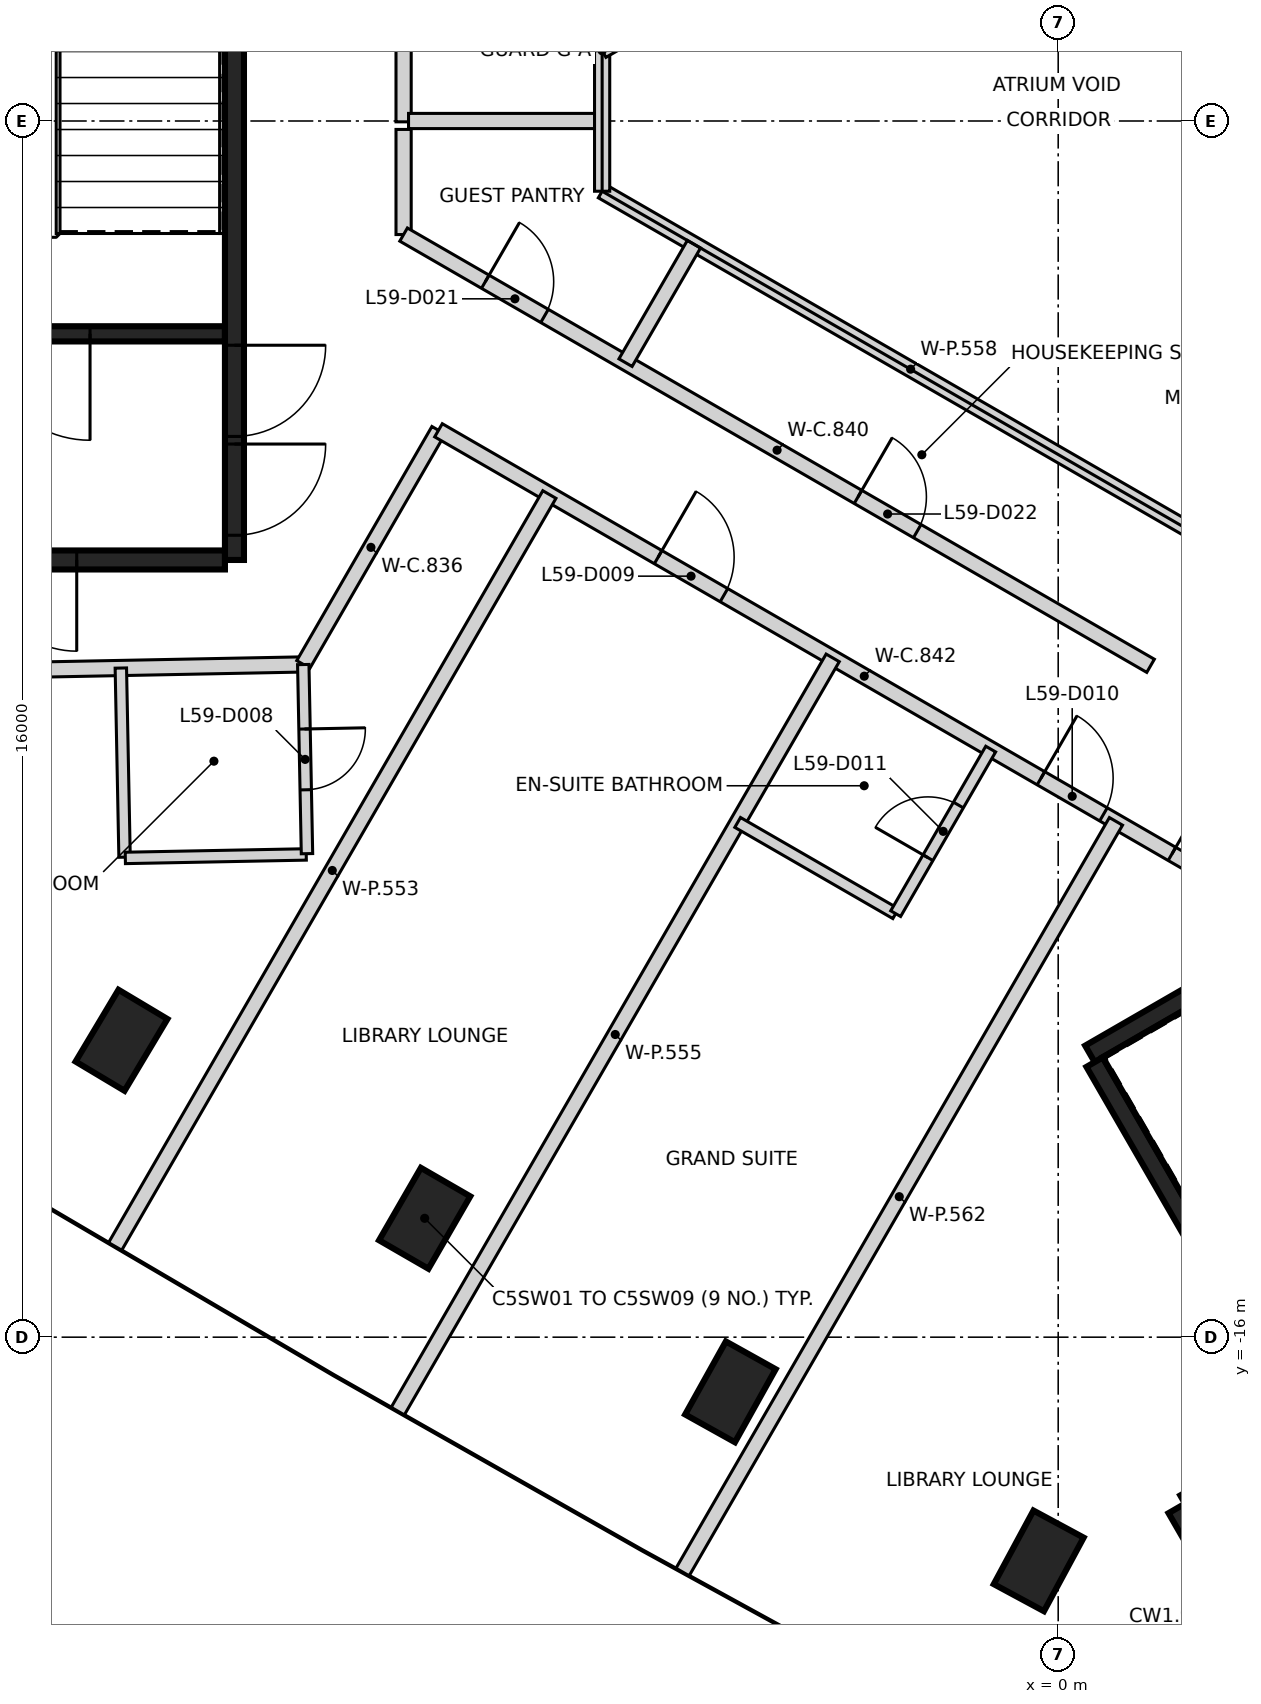
"""IFC4 building model, lengths in metres.
Left out: names, types, materials, properties, quantities, classifications, styles, units other than length and angle.
Written with IfcOpenShell. Run it as: python <this file> out.ifc"""

import sys

from ifc_helpers import new_model, si_unit, direction, frame, frame_2d, origin, origin_2d, place, context, subcontext, project, spatial, rectangle, extrude, element, fill, save


model = new_model("IFC4")
c1 = context("Model", 3, precision=1e-05, world=origin(), true_north=direction((0.0, 1.0)))
c2 = subcontext(c1, "Body", "Model", "MODEL_VIEW")
j1 = project(units=[si_unit("LENGTHUNIT", "METRE"), si_unit("PLANEANGLEUNIT", "RADIAN")], contexts=[c1])
p1 = place(None, origin())
s1 = spatial("IfcSite", under=j1, at=p1, CompositionType="ELEMENT")
p2 = place(p1, origin())
s2 = spatial("IfcBuilding", under=s1, at=p2, CompositionType="ELEMENT")
p3 = place(p2, frame((0.0, 0.0, 235.8)))
s3 = spatial("IfcBuildingStorey", under=s2, at=p3, CompositionType="ELEMENT", Elevation=235.8)
for number, where, z_axis, x_axis in (
    (1, (-12.323, -12.094, -0.35), (0.0, 0.0, 1.0), (0.513, 0.858, 0.0)),
    (2, (-8.335, -14.436, -0.35), (0.0, 0.0, 1.0), (0.5, 0.866, 0.0)),
    (3, (-4.312, -16.719, -0.35), (0.0, 0.0, 1.0), (0.487, 0.873, 0.0)),
    (4, (-0.256, -18.943, -0.35), (0.0, 0.0, 1.0), (0.475, 0.88, 0.0)),
):
    element("IfcColumn", number, at=place(p3, frame(where, z_axis=z_axis, x_axis=x_axis)), inside=s3, PredefinedType="COLUMN", context=c2, shape_type="SweptSolid", body=[
        extrude(rectangle(XDim=1.1, YDim=0.75, at=origin_2d()), origin(), (0.0, 0.0, 1.0), 3.6),
    ])
p4 = place(p3, frame((-10.837, 5.775, 0.0), z_axis=(0.0, 0.0, 1.0), x_axis=(0.0, -1.0, 0.0)))
e5 = element("IfcWall", 5, at=p4, inside=s3, PredefinedType="SHEAR", context=c2, shape_type="SweptSolid", body=[
    extrude(rectangle(XDim=11.55, YDim=0.25, at=frame_2d((5.775, 0.0))), origin(), (0.0, 0.0, 1.0), 3.25),
])
p5 = place(p4, frame((10.025, 0.0, 0.0)))
e6 = element("IfcOpeningElement", 6, at=p5, cuts=e5, PredefinedType="OPENING", context=c2, shape_type="SweptSolid", body=[
    extrude(rectangle(XDim=1.2, YDim=2.1, at=frame_2d((0.6, 1.05))), frame((0.0, 0.135, 0.0), z_axis=(0.0, -1.0, 0.0), x_axis=(1.0, 0.0, 0.0)), (0.0, 0.0, 1.0), 0.27),
])
p6 = place(p4, frame((8.725, 0.0, 0.0)))
e7 = element("IfcOpeningElement", 7, at=p6, cuts=e5, PredefinedType="OPENING", context=c2, shape_type="SweptSolid", body=[
    extrude(rectangle(XDim=1.2, YDim=2.1, at=frame_2d((0.6, 1.05))), frame((0.0, 0.135, 0.0), z_axis=(0.0, -1.0, 0.0), x_axis=(1.0, 0.0, 0.0)), (0.0, 0.0, 1.0), 0.27),
])
p7 = place(p3, frame((-10.963, -5.775, 0.0), z_axis=(0.0, 0.0, 1.0), x_axis=(-1.0, 0.0, 0.0)))
e8 = element("IfcWall", 8, at=p7, inside=s3, PredefinedType="SHEAR", context=c2, shape_type="SweptSolid", body=[
    extrude(rectangle(XDim=5.225, YDim=0.25, at=frame_2d((2.612, 0.0))), origin(), (0.0, 0.0, 1.0), 3.25),
])
p8 = place(p7, frame((1.95, 0.0, 0.0)))
e9 = element("IfcOpeningElement", 9, at=p8, cuts=e8, PredefinedType="OPENING", context=c2, shape_type="SweptSolid", body=[
    extrude(rectangle(XDim=1.2, YDim=2.1, at=frame_2d((0.6, 1.05))), frame((0.0, 0.135, 0.0), z_axis=(0.0, -1.0, 0.0), x_axis=(1.0, 0.0, 0.0)), (0.0, 0.0, 1.0), 0.27),
])
p9 = place(p3, frame((-10.963, -2.8, 0.0), z_axis=(0.0, 0.0, 1.0), x_axis=(-1.0, 0.0, 0.0)))
e10 = element("IfcWall", 10, at=p9, inside=s3, PredefinedType="SHEAR", context=c2, shape_type="SweptSolid", body=[
    extrude(rectangle(XDim=5.098, YDim=0.2, at=frame_2d((2.549, 0.0))), origin(), (0.0, 0.0, 1.0), 3.25),
])
p10 = place(p9, frame((1.774, 0.0, 0.0)))
e11 = element("IfcOpeningElement", 11, at=p10, cuts=e10, PredefinedType="OPENING", context=c2, shape_type="SweptSolid", body=[
    extrude(rectangle(XDim=1.4, YDim=2.1, at=frame_2d((0.7, 1.05))), frame((0.0, 0.11, 0.0), z_axis=(0.0, -1.0, 0.0), x_axis=(1.0, 0.0, 0.0)), (0.0, 0.0, 1.0), 0.22),
])
p11 = place(p3, frame((0.417, -12.273, 0.0), z_axis=(0.0, 0.0, 1.0), x_axis=(0.866021906294, 0.500006057782, 0.0)))
e12 = element("IfcWall", 12, at=p11, inside=s3, PredefinedType="SHEAR", context=c2, shape_type="SweptSolid", body=[
    extrude(rectangle(XDim=11.55, YDim=0.25, at=frame_2d((5.775, 0.0))), origin(), (0.0, 0.0, 1.0), 3.25),
])
p12 = place(p11, frame((10.025, 0.0, 0.0)))
e13 = element("IfcOpeningElement", 13, at=p12, cuts=e12, PredefinedType="OPENING", context=c2, shape_type="SweptSolid", body=[
    extrude(rectangle(XDim=1.2, YDim=2.1, at=frame_2d((0.6, 1.05))), frame((0.0, 0.135, 0.0), z_axis=(0.0, -1.0, 0.0), x_axis=(1.0, 0.0, 0.0)), (0.0, 0.0, 1.0), 0.27),
])
p13 = place(p11, frame((8.725, 0.0, 0.0)))
e14 = element("IfcOpeningElement", 14, at=p13, cuts=e12, PredefinedType="OPENING", context=c2, shape_type="SweptSolid", body=[
    extrude(rectangle(XDim=1.2, YDim=2.1, at=frame_2d((0.6, 1.05))), frame((0.0, 0.135, 0.0), z_axis=(0.0, -1.0, 0.0), x_axis=(1.0, 0.0, 0.0)), (0.0, 0.0, 1.0), 0.27),
])
p14 = place(p3, frame((3.235, -17.153, 0.0), z_axis=(0.0, 0.0, 1.0), x_axis=(-0.500008851346, 0.866020293397, 0.0)))
e15 = element("IfcWall", 15, at=p14, inside=s3, PredefinedType="SHEAR", context=c2, shape_type="SweptSolid", body=[
    extrude(rectangle(XDim=5.51, YDim=0.25, at=frame_2d((2.755, 0.0))), origin(), (0.0, 0.0, 1.0), 3.25),
])
p15 = place(p3, frame((3.217, -21.122, 0.0), z_axis=(0.0, 0.0, 1.0), x_axis=(-0.499998874531, 0.866026053573, 0.0)))
e16 = element("IfcWall", 16, at=p15, inside=s3, PredefinedType="SHEAR", context=c2, shape_type="SweptSolid", body=[
    extrude(rectangle(XDim=3.313, YDim=0.25, at=frame_2d((1.656, 0.0))), origin(), (0.0, 0.0, 1.0), 3.25),
])
p16 = place(p3, frame((1.669, -18.19, 0.0), z_axis=(0.0, 0.0, 1.0), x_axis=(0.866042235819, 0.499970844928, 0.0)))
e17 = element("IfcWall", 17, at=p16, inside=s3, PredefinedType="SHEAR", context=c2, shape_type="SweptSolid", body=[
    extrude(rectangle(XDim=2.865, YDim=0.25, at=frame_2d((1.432, 0.0))), origin(), (0.0, 0.0, 1.0), 3.25),
])
p17 = place(p3, frame((-19.149, -7.329, 0.0), z_axis=(0.0, 0.0, 1.0), x_axis=(0.999810023919, 0.019491435849, 0.0)))
e18 = element("IfcWall", 18, at=p17, inside=s3, PredefinedType="PARTITIONING", context=c2, shape_type="SweptSolid", body=[
    extrude(rectangle(XDim=9.219, YDim=0.2, at=frame_2d((4.609, 0.0))), origin(), (0.0, 0.0, 1.0), 3.25),
])
p18 = place(p17, frame((3.23, 0.0, 0.0)))
e19 = element("IfcOpeningElement", 19, at=p18, cuts=e18, PredefinedType="OPENING", context=c2, shape_type="SweptSolid", body=[
    extrude(rectangle(XDim=0.95, YDim=2.1, at=frame_2d((0.475, 1.05))), frame((0.0, 0.11, 0.0), z_axis=(0.0, -1.0, 0.0), x_axis=(1.0, 0.0, 0.0)), (0.0, 0.0, 1.0), 0.22),
])
p19 = place(p3, frame((-9.931, -7.149, 0.0), z_axis=(0.0, 0.0, 1.0), x_axis=(0.499934418432, 0.86606326401, 0.0)))
e20 = element("IfcWall", 20, at=p19, inside=s3, PredefinedType="PARTITIONING", context=c2, shape_type="SweptSolid", body=[
    extrude(rectangle(XDim=3.556, YDim=0.2, at=frame_2d((1.778, 0.0))), origin(), (0.0, 0.0, 1.0), 3.25),
])
p20 = place(p3, frame((-8.612, -1.494, 0.0), z_axis=(0.0, 0.0, 1.0), x_axis=(0.0, 1.0, 0.0)))
e21 = element("IfcWall", 21, at=p20, inside=s3, PredefinedType="PARTITIONING", context=c2, shape_type="SweptSolid", body=[
    extrude(rectangle(XDim=1.383, YDim=0.2, at=frame_2d((0.691, 0.0))), origin(), (0.0, 0.0, 1.0), 3.25),
])
p21 = place(p3, frame((-8.612, -1.494, 0.0), z_axis=(0.0, 0.0, 1.0), x_axis=(0.866035468681, -0.499982566683, 0.0)))
e22 = element("IfcWall", 22, at=p21, inside=s3, PredefinedType="PARTITIONING", context=c2, shape_type="SweptSolid", body=[
    extrude(rectangle(XDim=11.348, YDim=0.2, at=frame_2d((5.674, 0.0))), origin(), (0.0, 0.0, 1.0), 3.25),
])
p22 = place(p21, frame((1.241, 0.0, 0.0)))
e23 = element("IfcOpeningElement", 23, at=p22, cuts=e22, PredefinedType="OPENING", context=c2, shape_type="SweptSolid", body=[
    extrude(rectangle(XDim=0.9, YDim=2.1, at=frame_2d((0.45, 1.05))), frame((0.0, 0.11, 0.0), z_axis=(0.0, -1.0, 0.0), x_axis=(1.0, 0.0, 0.0)), (0.0, 0.0, 1.0), 0.22),
])
p23 = place(p21, frame((6.903, 0.0, 0.0)))
e24 = element("IfcOpeningElement", 24, at=p23, cuts=e22, PredefinedType="OPENING", context=c2, shape_type="SweptSolid", body=[
    extrude(rectangle(XDim=0.9, YDim=2.1, at=frame_2d((0.45, 1.05))), frame((0.0, 0.11, 0.0), z_axis=(0.0, -1.0, 0.0), x_axis=(1.0, 0.0, 0.0)), (0.0, 0.0, 1.0), 0.22),
])
p24 = place(p3, frame((-8.612, -0.011, 0.0), z_axis=(0.0, 0.0, 1.0), x_axis=(0.0, 1.0, 0.0)))
e25 = element("IfcWall", 25, at=p24, inside=s3, PredefinedType="PARTITIONING", context=c2, shape_type="SweptSolid", body=[
    extrude(rectangle(XDim=1.505, YDim=0.2, at=frame_2d((0.752, 0.0))), origin(), (0.0, 0.0, 1.0), 3.25),
])
p25 = place(p3, frame((-8.153, -4.069, 0.0), z_axis=(0.0, 0.0, 1.0), x_axis=(0.865955522833, -0.500121017829, 0.0)))
e26 = element("IfcWall", 26, at=p25, inside=s3, PredefinedType="PARTITIONING", context=c2, shape_type="SweptSolid", body=[
    extrude(rectangle(XDim=12.937, YDim=0.2, at=frame_2d((6.469, 0.0))), origin(), (0.0, 0.0, 1.0), 3.25),
])
p26 = place(p25, frame((3.337, 0.0, 0.0)))
e27 = element("IfcOpeningElement", 27, at=p26, cuts=e26, PredefinedType="OPENING", context=c2, shape_type="SweptSolid", body=[
    extrude(rectangle(XDim=1.0, YDim=2.1, at=frame_2d((0.5, 1.05))), frame((0.0, 0.11, 0.0), z_axis=(0.0, -1.0, 0.0), x_axis=(1.0, 0.0, 0.0)), (0.0, 0.0, 1.0), 0.22),
])
p27 = place(p25, frame((9.153, 0.0, 0.0)))
e28 = element("IfcOpeningElement", 28, at=p27, cuts=e26, PredefinedType="OPENING", context=c2, shape_type="SweptSolid", body=[
    extrude(rectangle(XDim=0.95, YDim=2.1, at=frame_2d((0.475, 1.05))), frame((0.0, 0.11, 0.0), z_axis=(0.0, -1.0, 0.0), x_axis=(1.0, 0.0, 0.0)), (0.0, 0.0, 1.0), 0.22),
])
p28 = place(p25, frame((11.144, 0.0, 0.0)))
e29 = element("IfcOpeningElement", 29, at=p28, cuts=e26, PredefinedType="OPENING", context=c2, shape_type="SweptSolid", body=[
    extrude(rectangle(XDim=1.0, YDim=2.1, at=frame_2d((0.5, 1.05))), frame((0.0, 0.11, 0.0), z_axis=(0.0, -1.0, 0.0), x_axis=(1.0, 0.0, 0.0)), (0.0, 0.0, 1.0), 0.22),
])
p29 = place(p3, frame((-12.407, -14.806, 0.0), z_axis=(0.0, 0.0, 1.0), x_axis=(0.500104175471, 0.865965249693, 0.0)))
e30 = element("IfcWall", 30, at=p29, inside=s3, PredefinedType="PARTITIONING", context=c2, shape_type="SweptSolid", body=[
    extrude(rectangle(XDim=11.423, YDim=0.2, at=frame_2d((5.711, 0.0))), origin(), (0.0, 0.0, 1.0), 2.35),
])
p30 = place(p3, frame((-8.688, -16.973, 0.0), z_axis=(0.0, 0.0, 1.0), x_axis=(0.500021643343, 0.866012907634, 0.0)))
e31 = element("IfcWall", 31, at=p30, inside=s3, PredefinedType="PARTITIONING", context=c2, shape_type="SweptSolid", body=[
    extrude(rectangle(XDim=11.443, YDim=0.2, at=frame_2d((5.721, 0.0))), origin(), (0.0, 0.0, 1.0), 2.35),
])
p31 = place(p3, frame((-8.547, 0.0, 0.0), z_axis=(0.0, 0.0, 1.0), x_axis=(1.0, 0.0, 0.0)))
e32 = element("IfcWall", 32, at=p31, inside=s3, PredefinedType="PARTITIONING", context=c2, shape_type="SweptSolid", body=[
    extrude(rectangle(XDim=2.547, YDim=0.2, at=frame_2d((1.273, 0.0))), origin(), (0.0, 0.0, 1.0), 3.25),
])
p32 = place(p3, frame((-6.0, -0.924, 0.0), z_axis=(0.0, 0.0, 1.0), x_axis=(0.866223755075, -0.499656288007, 0.0)))
e33 = element("IfcWall", 33, at=p32, inside=s3, PredefinedType="PARTITIONING", context=c2, shape_type="SweptSolid", body=[
    extrude(rectangle(XDim=9.37, YDim=0.2, at=frame_2d((4.685, 0.0))), origin(), (0.0, 0.0, 1.0), 3.25),
])
p33 = place(p3, frame((-6.0, -0.924, 0.0), z_axis=(0.0, 0.0, 1.0), x_axis=(0.0, 1.0, 0.0)))
e34 = element("IfcWall", 34, at=p33, inside=s3, PredefinedType="PARTITIONING", context=c2, shape_type="SweptSolid", body=[
    extrude(rectangle(XDim=1.848, YDim=0.2, at=frame_2d((0.924, 0.0))), origin(), (0.0, 0.0, 1.0), 3.25),
])
p34 = place(p3, frame((-6.0, 0.924, 0.0), z_axis=(0.0, 0.0, 1.0), x_axis=(0.866012967051, 0.500021540435, 0.0)))
e35 = element("IfcWall", 35, at=p34, inside=s3, PredefinedType="PARTITIONING", context=c2, shape_type="SweptSolid", body=[
    extrude(rectangle(XDim=9.468, YDim=0.2, at=frame_2d((4.734, 0.0))), origin(), (0.0, 0.0, 1.0), 3.25),
])
p35 = place(p3, frame((-5.692, -3.179, 0.0), z_axis=(0.0, 0.0, 1.0), x_axis=(0.500164619231, 0.865930339964, 0.0)))
e36 = element("IfcWall", 36, at=p35, inside=s3, PredefinedType="PARTITIONING", context=c2, shape_type="SweptSolid", body=[
    extrude(rectangle(XDim=1.8, YDim=0.2, at=frame_2d((0.9, 0.0))), origin(), (0.0, 0.0, 1.0), 3.25),
])
p36 = place(p3, frame((-4.942, -19.089, 0.0), z_axis=(0.0, 0.0, 1.0), x_axis=(0.500021458202, 0.866013014531, 0.0)))
e37 = element("IfcWall", 37, at=p36, inside=s3, PredefinedType="PARTITIONING", context=c2, shape_type="SweptSolid", body=[
    extrude(rectangle(XDim=11.403, YDim=0.2, at=frame_2d((5.701, 0.0))), origin(), (0.0, 0.0, 1.0), 2.35),
])
p37 = place(p3, frame((-12.332, -7.197, 0.0), z_axis=(0.0, 0.0, 1.0), x_axis=(0.019719450113, -0.999805552739, 0.0)))
e38 = element("IfcWall", 38, at=p37, inside=s3, PredefinedType="PARTITIONING", context=c2, shape_type="SweptSolid", body=[
    extrude(rectangle(XDim=2.489, YDim=0.15, at=frame_2d((1.244, 0.0))), origin(), (0.0, 0.0, 1.0), 3.25),
])
p38 = place(p3, frame((-12.273, -9.695, 0.0), z_axis=(0.0, 0.0, 1.0), x_axis=(0.999812094216, 0.019384949303, 0.0)))
e39 = element("IfcWall", 39, at=p38, inside=s3, PredefinedType="PARTITIONING", context=c2, shape_type="SweptSolid", body=[
    extrude(rectangle(XDim=2.38, YDim=0.15, at=frame_2d((1.19, 0.0))), origin(), (0.0, 0.0, 1.0), 3.25),
])
p39 = place(p3, frame((-9.932, -7.151, 0.0), z_axis=(0.0, 0.0, 1.0), x_axis=(0.019621381261, -0.999807482167, 0.0)))
e40 = element("IfcWall", 40, at=p39, inside=s3, PredefinedType="PARTITIONING", context=c2, shape_type="SweptSolid", body=[
    extrude(rectangle(XDim=2.489, YDim=0.15, at=frame_2d((1.244, 0.0))), origin(), (0.0, 0.0, 1.0), 3.25),
])
p40 = place(p39, frame((0.848, 0.0, 0.0)))
e41 = element("IfcOpeningElement", 41, at=p40, cuts=e40, PredefinedType="OPENING", context=c2, shape_type="SweptSolid", body=[
    extrude(rectangle(XDim=0.8, YDim=2.1, at=frame_2d((0.4, 1.05))), frame((0.0, 0.085, 0.0), z_axis=(0.0, -1.0, 0.0), x_axis=(1.0, 0.0, 0.0)), (0.0, 0.0, 1.0), 0.17),
])
p41 = place(p3, frame((-4.217, -9.228, 0.0), z_axis=(0.0, 0.0, 1.0), x_axis=(0.866100915363, -0.499869187296, 0.0)))
e42 = element("IfcWall", 42, at=p41, inside=s3, PredefinedType="PARTITIONING", context=c2, shape_type="SweptSolid", body=[
    extrude(rectangle(XDim=2.401, YDim=0.15, at=frame_2d((1.2, 0.0))), origin(), (0.0, 0.0, 1.0), 3.25),
])
p42 = place(p3, frame((-2.138, -10.428, 0.0), z_axis=(0.0, 0.0, 1.0), x_axis=(0.500004234368, 0.866022959057, 0.0)))
e43 = element("IfcWall", 43, at=p42, inside=s3, PredefinedType="PARTITIONING", context=c2, shape_type="SweptSolid", body=[
    extrude(rectangle(XDim=2.5, YDim=0.15, at=frame_2d((1.25, 0.0))), origin(), (0.0, 0.0, 1.0), 3.25),
])
p43 = place(p42, frame((0.85, 0.0, 0.0)))
e44 = element("IfcOpeningElement", 44, at=p43, cuts=e43, PredefinedType="OPENING", context=c2, shape_type="SweptSolid", body=[
    extrude(rectangle(XDim=0.8, YDim=2.1, at=frame_2d((0.4, 1.05))), frame((0.0, 0.085, 0.0), z_axis=(0.0, -1.0, 0.0), x_axis=(1.0, 0.0, 0.0)), (0.0, 0.0, 1.0), 0.17),
])
p44 = place(p5, origin())
e45 = element("IfcDoor", 45, at=p44, inside=s3, OperationType="SINGLE_SWING_LEFT", PredefinedType="DOOR", context=c2, shape_type="SweptSolid", body=[
    extrude(rectangle(XDim=1.2, YDim=2.1, at=frame_2d((0.6, 1.05))), frame((0.0, 0.025, 0.0), z_axis=(0.0, -1.0, 0.0), x_axis=(1.0, 0.0, 0.0)), (0.0, 0.0, 1.0), 0.05),
])
fill(e6, e45)
p45 = place(p6, origin())
e46 = element("IfcDoor", 46, at=p45, inside=s3, OperationType="SINGLE_SWING_RIGHT", PredefinedType="DOOR", context=c2, shape_type="SweptSolid", body=[
    extrude(rectangle(XDim=1.2, YDim=2.1, at=frame_2d((0.6, 1.05))), frame((0.0, 0.025, 0.0), z_axis=(0.0, -1.0, 0.0), x_axis=(1.0, 0.0, 0.0)), (0.0, 0.0, 1.0), 0.05),
])
fill(e7, e46)
p46 = place(p10, origin())
e47 = element("IfcDoor", 47, at=p46, inside=s3, OperationType="SINGLE_SWING_LEFT", PredefinedType="DOOR", context=c2, shape_type="SweptSolid", body=[
    extrude(rectangle(XDim=1.4, YDim=2.1, at=frame_2d((0.7, 1.05))), frame((0.0, 0.025, 0.0), z_axis=(0.0, -1.0, 0.0), x_axis=(1.0, 0.0, 0.0)), (0.0, 0.0, 1.0), 0.05),
])
fill(e11, e47)
p47 = place(p8, origin())
e48 = element("IfcDoor", 48, at=p47, inside=s3, OperationType="SINGLE_SWING_RIGHT", PredefinedType="DOOR", context=c2, shape_type="SweptSolid", body=[
    extrude(rectangle(XDim=1.2, YDim=2.1, at=frame_2d((0.6, 1.05))), frame((0.0, 0.025, 0.0), z_axis=(0.0, -1.0, 0.0), x_axis=(1.0, 0.0, 0.0)), (0.0, 0.0, 1.0), 0.05),
])
fill(e9, e48)
p48 = place(p40, frame((0.8, 0.0, 0.0), z_axis=(0.0, 0.0, 1.0), x_axis=(-1.0, 0.0, 0.0)))
e49 = element("IfcDoor", 49, at=p48, inside=s3, OperationType="SINGLE_SWING_LEFT", PredefinedType="DOOR", context=c2, shape_type="SweptSolid", body=[
    extrude(rectangle(XDim=0.8, YDim=2.1, at=frame_2d((0.4, 1.05))), frame((0.0, 0.025, 0.0), z_axis=(0.0, -1.0, 0.0), x_axis=(1.0, 0.0, 0.0)), (0.0, 0.0, 1.0), 0.05),
])
fill(e41, e49)
p49 = place(p26, frame((1.0, 0.0, 0.0), z_axis=(0.0, 0.0, 1.0), x_axis=(-1.0, 0.0, 0.0)))
e50 = element("IfcDoor", 50, at=p49, inside=s3, OperationType="SINGLE_SWING_LEFT", PredefinedType="DOOR", context=c2, shape_type="SweptSolid", body=[
    extrude(rectangle(XDim=1.0, YDim=2.1, at=frame_2d((0.5, 1.05))), frame((0.0, 0.025, 0.0), z_axis=(0.0, -1.0, 0.0), x_axis=(1.0, 0.0, 0.0)), (0.0, 0.0, 1.0), 0.05),
])
fill(e27, e50)
p50 = place(p27, frame((0.95, 0.0, 0.0), z_axis=(0.0, 0.0, 1.0), x_axis=(-1.0, 0.0, 0.0)))
e51 = element("IfcDoor", 51, at=p50, inside=s3, OperationType="SINGLE_SWING_LEFT", PredefinedType="DOOR", context=c2, shape_type="SweptSolid", body=[
    extrude(rectangle(XDim=0.95, YDim=2.1, at=frame_2d((0.475, 1.05))), frame((0.0, 0.025, 0.0), z_axis=(0.0, -1.0, 0.0), x_axis=(1.0, 0.0, 0.0)), (0.0, 0.0, 1.0), 0.05),
])
fill(e28, e51)
p51 = place(p43, origin())
e52 = element("IfcDoor", 52, at=p51, inside=s3, OperationType="SINGLE_SWING_LEFT", PredefinedType="DOOR", context=c2, shape_type="SweptSolid", body=[
    extrude(rectangle(XDim=0.8, YDim=2.1, at=frame_2d((0.4, 1.05))), frame((0.0, 0.025, 0.0), z_axis=(0.0, -1.0, 0.0), x_axis=(1.0, 0.0, 0.0)), (0.0, 0.0, 1.0), 0.05),
])
fill(e44, e52)
p52 = place(p28, frame((1.0, 0.0, 0.0), z_axis=(0.0, 0.0, 1.0), x_axis=(-1.0, 0.0, 0.0)))
e53 = element("IfcDoor", 53, at=p52, inside=s3, OperationType="SINGLE_SWING_LEFT", PredefinedType="DOOR", context=c2, shape_type="SweptSolid", body=[
    extrude(rectangle(XDim=1.0, YDim=2.1, at=frame_2d((0.5, 1.05))), frame((0.0, 0.025, 0.0), z_axis=(0.0, -1.0, 0.0), x_axis=(1.0, 0.0, 0.0)), (0.0, 0.0, 1.0), 0.05),
])
fill(e29, e53)
p53 = place(p22, origin())
e54 = element("IfcDoor", 54, at=p53, inside=s3, OperationType="SINGLE_SWING_LEFT", PredefinedType="DOOR", context=c2, shape_type="SweptSolid", body=[
    extrude(rectangle(XDim=0.9, YDim=2.1, at=frame_2d((0.45, 1.05))), frame((0.0, 0.025, 0.0), z_axis=(0.0, -1.0, 0.0), x_axis=(1.0, 0.0, 0.0)), (0.0, 0.0, 1.0), 0.05),
])
fill(e23, e54)
p54 = place(p23, origin())
e55 = element("IfcDoor", 55, at=p54, inside=s3, OperationType="SINGLE_SWING_LEFT", PredefinedType="DOOR", context=c2, shape_type="SweptSolid", body=[
    extrude(rectangle(XDim=0.9, YDim=2.1, at=frame_2d((0.45, 1.05))), frame((0.0, 0.025, 0.0), z_axis=(0.0, -1.0, 0.0), x_axis=(1.0, 0.0, 0.0)), (0.0, 0.0, 1.0), 0.05),
])
fill(e24, e55)
save(model, sys.argv[1])
